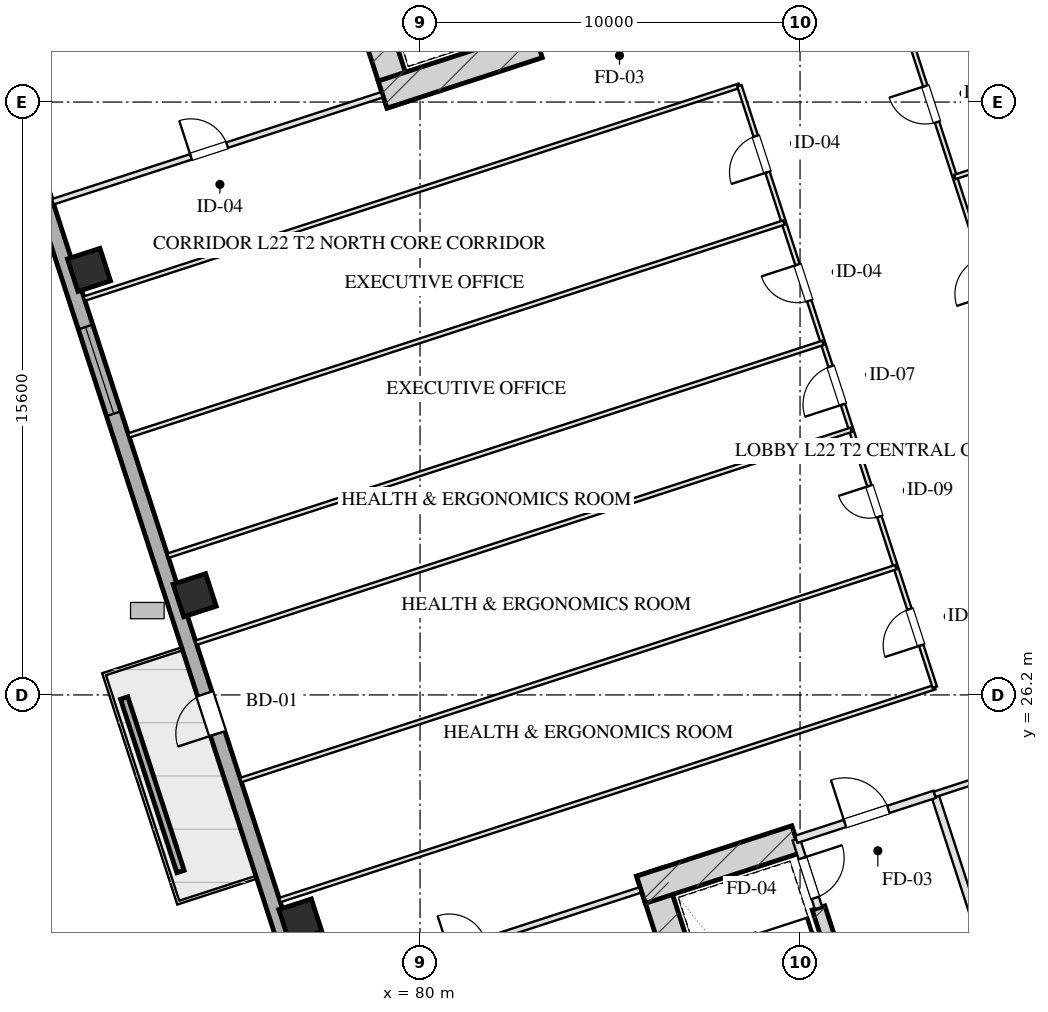
"""IFC4 building model, lengths in metres.
Left out: names, types, materials, properties, quantities, classifications, styles, units other than length and angle.
Written with IfcOpenShell. Run it as: python <this file> out.ifc"""

import sys

from ifc_helpers import new_model, si_unit, direction, frame, frame_2d, origin, origin_2d, place, context, subcontext, project, spatial, rectangle, hollow_rectangle, extrude, element, fill, save


model = new_model("IFC4")
c1 = context("Model", 3, precision=1e-05, world=origin(), true_north=direction((0.0, 1.0)))
c2 = subcontext(c1, "Body", "Model", "MODEL_VIEW")
j1 = project(units=[si_unit("LENGTHUNIT", "METRE"), si_unit("PLANEANGLEUNIT", "RADIAN")], contexts=[c1])
p1 = place(None, origin())
s1 = spatial("IfcSite", under=j1, at=p1, CompositionType="ELEMENT")
p2 = place(p1, origin())
s2 = spatial("IfcBuilding", under=s1, at=p2, CompositionType="ELEMENT")
p3 = place(p2, frame((0.0, 0.0, 88.55)))
s3 = spatial("IfcBuildingStorey", under=s2, at=p3, CompositionType="ELEMENT", Elevation=88.55)
p4 = place(p3, frame((86.055, 21.546, 0.0), z_axis=(0.0, 0.0, 1.0), x_axis=(0.309023585745, -0.951054374604, 0.0)))
e1 = element("IfcWall", 1, at=p4, inside=s3, PredefinedType="SHEAR", context=c2, shape_type="SweptSolid", body=[
    extrude(rectangle(XDim=9.63, YDim=0.75, at=frame_2d((4.815, 0.0))), origin(), (0.0, 0.0, 1.0), 3.45),
])
p5 = place(p3, frame((90.486, 20.594, 0.0), z_axis=(0.0, 0.0, 1.0), x_axis=(0.309020428229, -0.951055400562, 0.0)))
e2 = element("IfcWall", 2, at=p5, inside=s3, PredefinedType="SHEAR", context=c2, shape_type="SweptSolid", body=[
    extrude(rectangle(XDim=6.98, YDim=0.35, at=frame_2d((3.49, 0.0))), origin(), (0.0, 0.0, 1.0), 3.45),
])
p6 = place(p3, frame((85.814, 21.074, 0.0), z_axis=(0.0, 0.0, 1.0), x_axis=(0.95106580992, 0.308988390074, 0.0)))
e3 = element("IfcWall", 3, at=p6, inside=s3, PredefinedType="SHEAR", context=c2, shape_type="SweptSolid", body=[
    extrude(rectangle(XDim=4.295, YDim=0.75, at=frame_2d((2.147, 0.0))), origin(), (0.0, 0.0, 1.0), 3.45),
])
p7 = place(p3, frame((79.489, 41.756, 0.0), z_axis=(0.0, 0.0, 1.0), x_axis=(-0.309016134813, 0.951056795583, 0.0)))
e4 = element("IfcWall", 4, at=p7, inside=s3, PredefinedType="SHEAR", context=c2, shape_type="SweptSolid", body=[
    extrude(rectangle(XDim=9.63, YDim=0.75, at=frame_2d((4.815, 0.0))), origin(), (0.0, 0.0, 1.0), 3.45),
])
p8 = place(p3, frame((79.016, 41.997, 0.0), z_axis=(0.0, 0.0, 1.0), x_axis=(0.95106038264, 0.309005094736, 0.0)))
e5 = element("IfcWall", 5, at=p8, inside=s3, PredefinedType="SHEAR", context=c2, shape_type="SweptSolid", body=[
    extrude(rectangle(XDim=4.295, YDim=0.75, at=frame_2d((2.147, 0.0))), origin(), (0.0, 0.0, 1.0), 3.45),
])
for number, where, z_axis, x_axis in (
    (6, (76.851, 20.264, 0.0), (0.0, 0.0, 1.0), (0.951, 0.309, 0.0)),
    (7, (74.07, 28.824, 0.0), (0.0, 0.0, 1.0), (0.951, 0.309, 0.0)),
    (8, (71.289, 37.384, 0.0), (0.0, 0.0, 1.0), (0.951, 0.309, 0.0)),
):
    element("IfcColumn", number, at=place(p3, frame(where, z_axis=z_axis, x_axis=x_axis)), inside=s3, PredefinedType="COLUMN", context=c2, shape_type="SweptSolid", body=[
        extrude(hollow_rectangle(XDim=0.9, YDim=0.9, WallThickness=0.032, at=origin_2d()), origin(), (0.0, 0.0, 1.0), 3.451),
    ])
p9 = place(p3, frame((80.716, 6.59, 0.0), z_axis=(0.0, 0.0, 1.0), x_axis=(-0.309017542002, 0.95105633836, 0.0)))
e9 = element("IfcWall", 9, at=p9, inside=s3, PredefinedType="SOLIDWALL", context=c2, shape_type="SweptSolid", body=[
    extrude(rectangle(XDim=46.4, YDim=0.4, at=frame_2d((23.2, 0.0))), origin(), (0.0, 0.0, 1.0), 2.55),
])
p10 = place(p9, frame((28.4, 0.0, 0.75)))
e10 = element("IfcOpeningElement", 10, at=p10, cuts=e9, PredefinedType="OPENING", context=c2, shape_type="SweptSolid", body=[
    extrude(rectangle(XDim=2.4, YDim=1.4, at=frame_2d((1.2, 0.7))), frame((0.0, 0.21, 0.0), z_axis=(0.0, -1.0, 0.0), x_axis=(1.0, 0.0, 0.0)), (0.0, 0.0, 1.0), 0.42),
])
p11 = place(p9, frame((19.55, 0.0, 0.0)))
e11 = element("IfcOpeningElement", 11, at=p11, cuts=e9, PredefinedType="OPENING", context=c2, shape_type="SweptSolid", body=[
    extrude(rectangle(XDim=1.1, YDim=2.15, at=frame_2d((0.55, 1.075))), frame((0.0, 0.21, 0.0), z_axis=(0.0, -1.0, 0.0), x_axis=(1.0, 0.0, 0.0)), (0.0, 0.0, 1.0), 0.42),
])
p12 = place(p3, frame((73.698, 21.553, 0.0), z_axis=(0.0, 0.0, 1.0), x_axis=(-0.309032019345, 0.951051634255, 0.0)))
e12 = element("IfcWall", 12, at=p12, inside=s3, PredefinedType="PARAPET", context=c2, shape_type="SweptSolid", body=[
    extrude(rectangle(XDim=4.8, YDim=0.2, at=frame_2d((2.4, 0.0))), origin(), (0.0, 0.0, 1.0), 0.75),
])
p13 = place(p3, frame((89.899, 22.401, 0.0), z_axis=(0.0, 0.0, 1.0), x_axis=(0.308932062672, -0.951084108086, 0.0)))
e13 = element("IfcWall", 13, at=p13, inside=s3, PredefinedType="PARTITIONING", context=c2, shape_type="SweptSolid", body=[
    extrude(rectangle(XDim=1.9, YDim=0.2, at=frame_2d((0.95, 0.0))), origin(), (0.0, 0.0, 1.0), 3.155),
])
p14 = place(p13, frame((0.52, 0.0, 0.0)))
e14 = element("IfcOpeningElement", 14, at=p14, cuts=e13, PredefinedType="OPENING", context=c2, shape_type="SweptSolid", body=[
    extrude(rectangle(XDim=1.1, YDim=2.05, at=frame_2d((0.55, 1.025))), frame((0.0, 0.11, 0.0), z_axis=(0.0, -1.0, 0.0), x_axis=(1.0, 0.0, 0.0)), (0.0, 0.0, 1.0), 0.22),
])
p15 = place(p3, frame((93.542, 23.585, 0.0), z_axis=(0.0, 0.0, 1.0), x_axis=(0.309042196757, -0.951048327176, 0.0)))
e15 = element("IfcWall", 15, at=p15, inside=s3, PredefinedType="PARTITIONING", context=c2, shape_type="SweptSolid", body=[
    extrude(rectangle(XDim=8.43, YDim=0.2, at=frame_2d((4.215, 0.0))), origin(), (0.0, 0.0, 1.0), 3.155),
])
p16 = place(p3, frame((89.899, 22.401, 0.0), z_axis=(0.0, 0.0, 1.0), x_axis=(0.951046716504, 0.309047153403, 0.0)))
e16 = element("IfcWall", 16, at=p16, inside=s3, PredefinedType="PARTITIONING", context=c2, shape_type="SweptSolid", body=[
    extrude(rectangle(XDim=3.83, YDim=0.2, at=frame_2d((1.915, 0.0))), origin(), (0.0, 0.0, 1.0), 3.155),
])
p17 = place(p16, frame((1.35, 0.0, 0.0)))
e17 = element("IfcOpeningElement", 17, at=p17, cuts=e16, PredefinedType="OPENING", context=c2, shape_type="SweptSolid", body=[
    extrude(rectangle(XDim=1.2, YDim=2.05, at=frame_2d((0.6, 1.025))), frame((0.0, 0.11, 0.0), z_axis=(0.0, -1.0, 0.0), x_axis=(1.0, 0.0, 0.0)), (0.0, 0.0, 1.0), 0.22),
])
p18 = place(p3, frame((93.542, 23.585, 0.0), z_axis=(0.0, 0.0, 1.0), x_axis=(0.951063829732, 0.308994485023, 0.0)))
e18 = element("IfcWall", 18, at=p18, inside=s3, PredefinedType="PARTITIONING", context=c2, shape_type="SweptSolid", body=[
    extrude(rectangle(XDim=4.4, YDim=0.15, at=frame_2d((2.2, 0.0))), origin(), (0.0, 0.0, 1.0), 3.155),
])
p19 = place(p18, frame((1.45, 0.0, 0.0)))
e19 = element("IfcOpeningElement", 19, at=p19, cuts=e18, PredefinedType="OPENING", context=c2, shape_type="SweptSolid", body=[
    extrude(rectangle(XDim=1.5, YDim=2.05, at=frame_2d((0.75, 1.025))), frame((0.0, 0.085, 0.0), z_axis=(0.0, -1.0, 0.0), x_axis=(1.0, 0.0, 0.0)), (0.0, 0.0, 1.0), 0.17),
])
p20 = place(p3, frame((77.136, 18.254, 0.0), z_axis=(0.0, 0.0, 1.0), x_axis=(0.951057133767, 0.309015093986, 0.0)))
e20 = element("IfcWall", 20, at=p20, inside=s3, PredefinedType="PARTITIONING", context=c2, shape_type="SweptSolid", body=[
    extrude(rectangle(XDim=9.1, YDim=0.15, at=frame_2d((4.55, 0.0))), origin(), (0.0, 0.0, 1.0), 3.155),
])
p21 = place(p20, frame((3.822, 0.0, 0.0)))
e21 = element("IfcOpeningElement", 21, at=p21, cuts=e20, PredefinedType="OPENING", context=c2, shape_type="SweptSolid", body=[
    extrude(rectangle(XDim=1.0, YDim=2.05, at=frame_2d((0.5, 1.025))), frame((0.0, 0.085, 0.0), z_axis=(0.0, -1.0, 0.0), x_axis=(1.0, 0.0, 0.0)), (0.0, 0.0, 1.0), 0.17),
])
p22 = place(p3, frame((70.338, 39.177, 0.0), z_axis=(0.0, 0.0, 1.0), x_axis=(0.951059695568, 0.309007209409, 0.0)))
e22 = element("IfcWall", 22, at=p22, inside=s3, PredefinedType="PARTITIONING", context=c2, shape_type="SweptSolid", body=[
    extrude(rectangle(XDim=9.1, YDim=0.15, at=frame_2d((4.55, 0.0))), origin(), (0.0, 0.0, 1.0), 3.155),
])
p23 = place(p22, frame((3.822, 0.0, 0.0)))
e23 = element("IfcOpeningElement", 23, at=p23, cuts=e22, PredefinedType="OPENING", context=c2, shape_type="SweptSolid", body=[
    extrude(rectangle(XDim=1.0, YDim=2.05, at=frame_2d((0.5, 1.025))), frame((0.0, 0.085, 0.0), z_axis=(0.0, -1.0, 0.0), x_axis=(1.0, 0.0, 0.0)), (0.0, 0.0, 1.0), 0.17),
])
p24 = place(p3, frame((76.308, 20.803, 0.0), z_axis=(0.0, 0.0, 1.0), x_axis=(0.951054952586, 0.309021806935, 0.0)))
e24 = element("IfcWall", 24, at=p24, inside=s3, PredefinedType="PARTITIONING", context=c2, shape_type="SweptSolid", body=[
    extrude(rectangle(XDim=18.125, YDim=0.12, at=frame_2d((9.062, 0.0))), origin(), (0.0, 0.0, 1.0), 3.155),
])
p25 = place(p3, frame((71.166, 36.629, 0.0), z_axis=(0.0, 0.0, 1.0), x_axis=(0.951057625014, 0.309013582067, 0.0)))
e25 = element("IfcWall", 25, at=p25, inside=s3, PredefinedType="PARTITIONING", context=c2, shape_type="SweptSolid", body=[
    extrude(rectangle(XDim=18.125, YDim=0.12, at=frame_2d((9.062, 0.0))), origin(), (0.0, 0.0, 1.0), 3.155),
])
p26 = place(p3, frame((93.546, 26.404, 0.0), z_axis=(0.0, 0.0, 1.0), x_axis=(-0.309022042254, 0.951054876125, 0.0)))
e26 = element("IfcWall", 26, at=p26, inside=s3, PredefinedType="PARTITIONING", context=c2, shape_type="SweptSolid", body=[
    extrude(rectangle(XDim=16.64, YDim=0.12, at=frame_2d((8.32, 0.0))), origin(), (0.0, 0.0, 1.0), 3.155),
])
p27 = place(p26, frame((1.16, 0.0, 0.0)))
e27 = element("IfcOpeningElement", 27, at=p27, cuts=e26, PredefinedType="OPENING", context=c2, shape_type="SweptSolid", body=[
    extrude(rectangle(XDim=1.0, YDim=2.05, at=frame_2d((0.5, 1.025))), frame((0.0, 0.07, 0.0), z_axis=(0.0, -1.0, 0.0), x_axis=(1.0, 0.0, 0.0)), (0.0, 0.0, 1.0), 0.14),
])
p28 = place(p26, frame((4.72, 0.0, 0.0)))
e28 = element("IfcOpeningElement", 28, at=p28, cuts=e26, PredefinedType="OPENING", context=c2, shape_type="SweptSolid", body=[
    extrude(rectangle(XDim=0.85, YDim=2.05, at=frame_2d((0.425, 1.025))), frame((0.0, 0.07, 0.0), z_axis=(0.0, -1.0, 0.0), x_axis=(1.0, 0.0, 0.0)), (0.0, 0.0, 1.0), 0.14),
])
p29 = place(p26, frame((7.823, 0.0, 0.0)))
e29 = element("IfcOpeningElement", 29, at=p29, cuts=e26, PredefinedType="OPENING", context=c2, shape_type="SweptSolid", body=[
    extrude(rectangle(XDim=1.05, YDim=2.05, at=frame_2d((0.525, 1.025))), frame((0.0, 0.07, 0.0), z_axis=(0.0, -1.0, 0.0), x_axis=(1.0, 0.0, 0.0)), (0.0, 0.0, 1.0), 0.14),
])
p30 = place(p26, frame((10.69, 0.0, 0.0)))
e30 = element("IfcOpeningElement", 30, at=p30, cuts=e26, PredefinedType="OPENING", context=c2, shape_type="SweptSolid", body=[
    extrude(rectangle(XDim=1.0, YDim=2.05, at=frame_2d((0.5, 1.025))), frame((0.0, 0.07, 0.0), z_axis=(0.0, -1.0, 0.0), x_axis=(1.0, 0.0, 0.0)), (0.0, 0.0, 1.0), 0.14),
])
p31 = place(p26, frame((14.247, 0.0, 0.0)))
e31 = element("IfcOpeningElement", 31, at=p31, cuts=e26, PredefinedType="OPENING", context=c2, shape_type="SweptSolid", body=[
    extrude(rectangle(XDim=1.0, YDim=2.05, at=frame_2d((0.5, 1.025))), frame((0.0, 0.07, 0.0), z_axis=(0.0, -1.0, 0.0), x_axis=(1.0, 0.0, 0.0)), (0.0, 0.0, 1.0), 0.14),
])
p32 = place(p3, frame((97.968, 27.841, 0.0), z_axis=(0.0, 0.0, 1.0), x_axis=(-0.30901773025, 0.951056277195, 0.0)))
e32 = element("IfcWall", 32, at=p32, inside=s3, PredefinedType="PARTITIONING", context=c2, shape_type="SweptSolid", body=[
    extrude(rectangle(XDim=16.64, YDim=0.12, at=frame_2d((8.32, 0.0))), origin(), (0.0, 0.0, 1.0), 3.155),
])
p33 = place(p32, frame((3.06, 0.0, 0.0)))
e33 = element("IfcOpeningElement", 33, at=p33, cuts=e32, PredefinedType="OPENING", context=c2, shape_type="SweptSolid", body=[
    extrude(rectangle(XDim=1.0, YDim=2.05, at=frame_2d((0.5, 1.025))), frame((0.0, 0.07, 0.0), z_axis=(0.0, -1.0, 0.0), x_axis=(1.0, 0.0, 0.0)), (0.0, 0.0, 1.0), 0.14),
])
p34 = place(p32, frame((9.363, 0.0, 0.0)))
e34 = element("IfcOpeningElement", 34, at=p34, cuts=e32, PredefinedType="OPENING", context=c2, shape_type="SweptSolid", body=[
    extrude(rectangle(XDim=1.0, YDim=2.05, at=frame_2d((0.5, 1.025))), frame((0.0, 0.07, 0.0), z_axis=(0.0, -1.0, 0.0), x_axis=(1.0, 0.0, 0.0)), (0.0, 0.0, 1.0), 0.14),
])
p35 = place(p32, frame((14.123, 0.0, 0.0)))
e35 = element("IfcOpeningElement", 35, at=p35, cuts=e32, PredefinedType="OPENING", context=c2, shape_type="SweptSolid", body=[
    extrude(rectangle(XDim=1.0, YDim=2.05, at=frame_2d((0.5, 1.025))), frame((0.0, 0.07, 0.0), z_axis=(0.0, -1.0, 0.0), x_axis=(1.0, 0.0, 0.0)), (0.0, 0.0, 1.0), 0.14),
])
for number, where, z_axis, x_axis in (
    (36, (75.282, 23.96, 0.0), (0.0, 0.0, 1.0), (0.951, 0.309, 0.0)),
    (37, (74.108, 27.574, 0.0), (0.0, 0.0, 1.0), (0.951, 0.309, 0.0)),
):
    element("IfcWall", number, at=place(p3, frame(where, z_axis=z_axis, x_axis=x_axis)), inside=s3, PredefinedType="PARTITIONING", context=c2, shape_type="SweptSolid", body=[
        extrude(rectangle(XDim=18.125, YDim=0.12, at=frame_2d((9.062, 0.0))), origin(), (0.0, 0.0, 1.0), 3.155),
    ])
p36 = place(p3, frame((73.364, 29.863, 0.0), z_axis=(0.0, 0.0, 1.0), x_axis=(0.951057625014, 0.309013582067, 0.0)))
e38 = element("IfcWall", 38, at=p36, inside=s3, PredefinedType="PARTITIONING", context=c2, shape_type="SweptSolid", body=[
    extrude(rectangle(XDim=18.125, YDim=0.12, at=frame_2d((9.062, 0.0))), origin(), (0.0, 0.0, 1.0), 3.155),
])
p37 = place(p3, frame((72.336, 33.028, 0.0), z_axis=(0.0, 0.0, 1.0), x_axis=(0.951058911225, 0.309009623443, 0.0)))
e39 = element("IfcWall", 39, at=p37, inside=s3, PredefinedType="PARTITIONING", context=c2, shape_type="SweptSolid", body=[
    extrude(rectangle(XDim=18.125, YDim=0.12, at=frame_2d((9.062, 0.0))), origin(), (0.0, 0.0, 1.0), 3.155),
])
p38 = place(p3, frame((94.073, 39.829, 0.0), z_axis=(0.0, 0.0, 1.0), x_axis=(0.951057778088, 0.309013110947, 0.0)))
e40 = element("IfcWall", 40, at=p38, inside=s3, PredefinedType="PARTITIONING", context=c2, shape_type="SweptSolid", body=[
    extrude(rectangle(XDim=11.425, YDim=0.12, at=frame_2d((5.712, 0.0))), origin(), (0.0, 0.0, 1.0), 3.155),
])
p39 = place(p10, origin())
e41 = element("IfcWindow", 41, at=p39, inside=s3, PartitioningType="TRIPLE_PANEL_VERTICAL", PredefinedType="WINDOW", context=c2, shape_type="SweptSolid", body=[
    extrude(rectangle(XDim=2.4, YDim=1.4, at=frame_2d((1.2, 0.7))), frame((0.0, 0.03, 0.0), z_axis=(0.0, -1.0, 0.0), x_axis=(1.0, 0.0, 0.0)), (0.0, 0.0, 1.0), 0.06),
])
fill(e10, e41)
p40 = place(p11, origin())
e42 = element("IfcDoor", 42, at=p40, inside=s3, OperationType="SINGLE_SWING_LEFT", PredefinedType="DOOR", context=c2, shape_type="SweptSolid", body=[
    extrude(rectangle(XDim=1.1, YDim=2.15, at=frame_2d((0.55, 1.075))), frame((0.0, 0.025, 0.0), z_axis=(0.0, -1.0, 0.0), x_axis=(1.0, 0.0, 0.0)), (0.0, 0.0, 1.0), 0.05),
])
fill(e11, e42)
p41 = place(p14, origin())
e43 = element("IfcDoor", 43, at=p41, inside=s3, OperationType="SINGLE_SWING_LEFT", PredefinedType="DOOR", context=c2, shape_type="SweptSolid", body=[
    extrude(rectangle(XDim=1.1, YDim=2.05, at=frame_2d((0.55, 1.025))), frame((0.0, 0.025, 0.0), z_axis=(0.0, -1.0, 0.0), x_axis=(1.0, 0.0, 0.0)), (0.0, 0.0, 1.0), 0.05),
])
fill(e14, e43)
p42 = place(p17, origin())
e44 = element("IfcDoor", 44, at=p42, inside=s3, OperationType="SINGLE_SWING_LEFT", PredefinedType="DOOR", context=c2, shape_type="SweptSolid", body=[
    extrude(rectangle(XDim=1.2, YDim=2.05, at=frame_2d((0.6, 1.025))), frame((0.0, 0.025, 0.0), z_axis=(0.0, -1.0, 0.0), x_axis=(1.0, 0.0, 0.0)), (0.0, 0.0, 1.0), 0.05),
])
fill(e17, e44)
p43 = place(p23, origin())
e45 = element("IfcDoor", 45, at=p43, inside=s3, OperationType="SINGLE_SWING_LEFT", PredefinedType="DOOR", context=c2, shape_type="SweptSolid", body=[
    extrude(rectangle(XDim=1.0, YDim=2.05, at=frame_2d((0.5, 1.025))), frame((0.0, 0.025, 0.0), z_axis=(0.0, -1.0, 0.0), x_axis=(1.0, 0.0, 0.0)), (0.0, 0.0, 1.0), 0.05),
])
fill(e23, e45)
p44 = place(p27, origin())
e46 = element("IfcDoor", 46, at=p44, inside=s3, OperationType="SINGLE_SWING_LEFT", PredefinedType="DOOR", context=c2, shape_type="SweptSolid", body=[
    extrude(rectangle(XDim=1.0, YDim=2.05, at=frame_2d((0.5, 1.025))), frame((0.0, 0.025, 0.0), z_axis=(0.0, -1.0, 0.0), x_axis=(1.0, 0.0, 0.0)), (0.0, 0.0, 1.0), 0.05),
])
fill(e27, e46)
p45 = place(p28, origin())
e47 = element("IfcDoor", 47, at=p45, inside=s3, OperationType="SINGLE_SWING_RIGHT", PredefinedType="DOOR", context=c2, shape_type="SweptSolid", body=[
    extrude(rectangle(XDim=0.85, YDim=2.05, at=frame_2d((0.425, 1.025))), frame((0.0, 0.025, 0.0), z_axis=(0.0, -1.0, 0.0), x_axis=(1.0, 0.0, 0.0)), (0.0, 0.0, 1.0), 0.05),
])
fill(e28, e47)
p46 = place(p29, origin())
e48 = element("IfcDoor", 48, at=p46, inside=s3, OperationType="SINGLE_SWING_LEFT", PredefinedType="DOOR", context=c2, shape_type="SweptSolid", body=[
    extrude(rectangle(XDim=1.05, YDim=2.05, at=frame_2d((0.525, 1.025))), frame((0.0, 0.025, 0.0), z_axis=(0.0, -1.0, 0.0), x_axis=(1.0, 0.0, 0.0)), (0.0, 0.0, 1.0), 0.05),
])
fill(e29, e48)
p47 = place(p30, origin())
e49 = element("IfcDoor", 49, at=p47, inside=s3, OperationType="SINGLE_SWING_RIGHT", PredefinedType="DOOR", context=c2, shape_type="SweptSolid", body=[
    extrude(rectangle(XDim=1.0, YDim=2.05, at=frame_2d((0.5, 1.025))), frame((0.0, 0.025, 0.0), z_axis=(0.0, -1.0, 0.0), x_axis=(1.0, 0.0, 0.0)), (0.0, 0.0, 1.0), 0.05),
])
fill(e30, e49)
p48 = place(p31, origin())
e50 = element("IfcDoor", 50, at=p48, inside=s3, OperationType="SINGLE_SWING_LEFT", PredefinedType="DOOR", context=c2, shape_type="SweptSolid", body=[
    extrude(rectangle(XDim=1.0, YDim=2.05, at=frame_2d((0.5, 1.025))), frame((0.0, 0.025, 0.0), z_axis=(0.0, -1.0, 0.0), x_axis=(1.0, 0.0, 0.0)), (0.0, 0.0, 1.0), 0.05),
])
fill(e31, e50)
p49 = place(p35, origin())
e51 = element("IfcDoor", 51, at=p49, inside=s3, OperationType="SINGLE_SWING_RIGHT", PredefinedType="DOOR", context=c2, shape_type="SweptSolid", body=[
    extrude(rectangle(XDim=1.0, YDim=2.05, at=frame_2d((0.5, 1.025))), frame((0.0, 0.025, 0.0), z_axis=(0.0, -1.0, 0.0), x_axis=(1.0, 0.0, 0.0)), (0.0, 0.0, 1.0), 0.05),
])
fill(e35, e51)
save(model, sys.argv[1])
